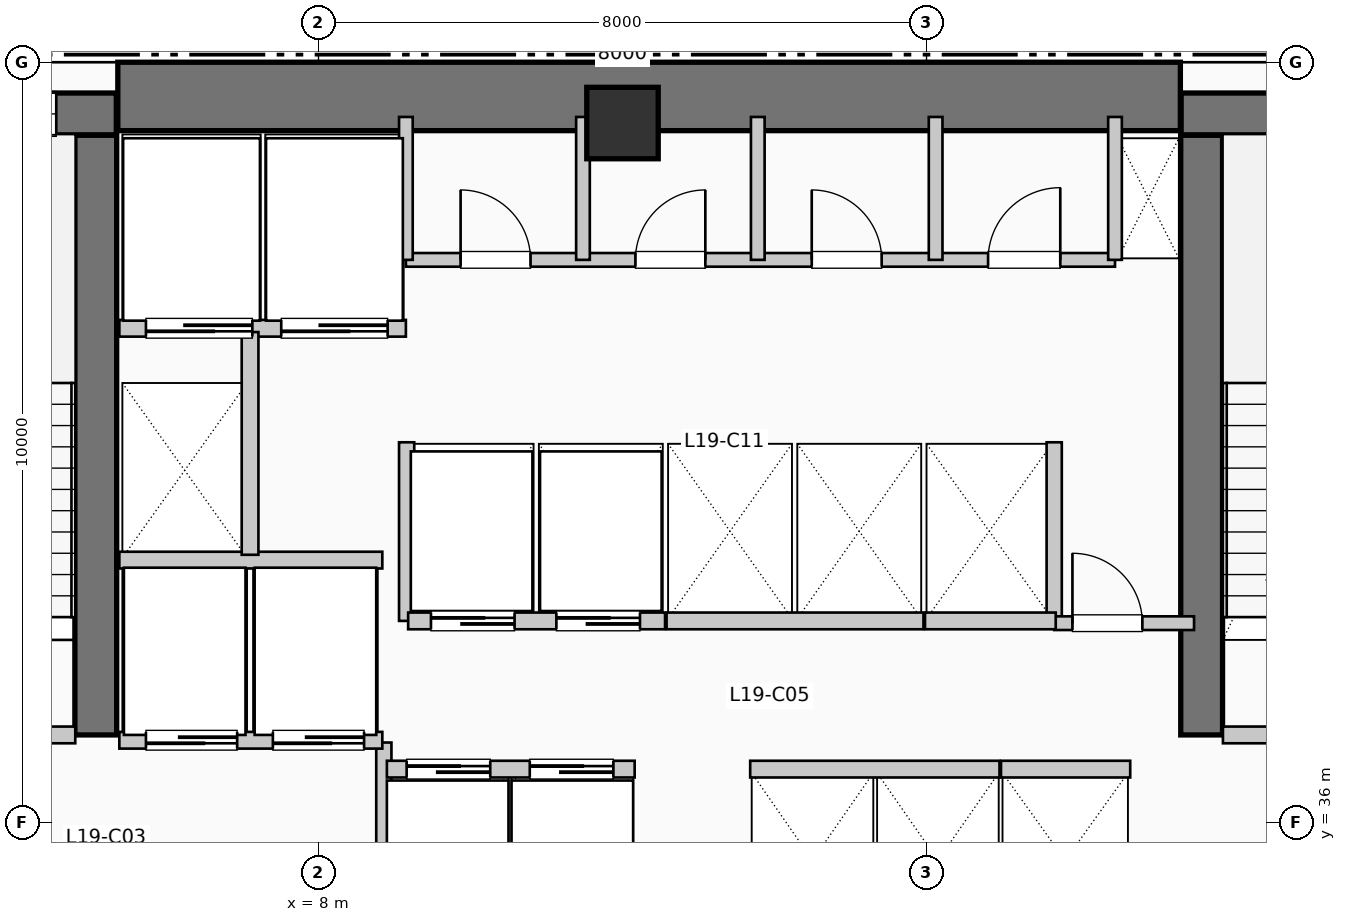
"""IFC4 building model, lengths in metres.
Left out: names, types, materials, properties, quantities, classifications, styles, units other than length and angle.
Written with IfcOpenShell. Run it as: python <this file> out.ifc"""

import sys

from ifc_helpers import new_model, si_unit, direction, frame, frame_2d, origin, origin_2d, place, context, subcontext, project, spatial, rectangle, extrude, element, fill, save


model = new_model("IFC4")
c1 = context("Model", 3, precision=1e-05, world=origin(), true_north=direction((0.0, 1.0)))
c2 = subcontext(c1, "Body", "Model", "MODEL_VIEW")
j1 = project(units=[si_unit("LENGTHUNIT", "METRE"), si_unit("PLANEANGLEUNIT", "RADIAN")], contexts=[c1])
p1 = place(None, origin())
s1 = spatial("IfcSite", under=j1, at=p1, CompositionType="ELEMENT")
p2 = place(p1, origin())
s2 = spatial("IfcBuilding", under=s1, at=p2, CompositionType="ELEMENT")
p3 = place(p2, frame((0.0, 0.0, 81.84)))
s3 = spatial("IfcBuildingStorey", under=s2, at=p3, CompositionType="ELEMENT", Elevation=81.84)
p4 = place(p3, frame((5.36, 45.55, 0.0), z_axis=(0.0, 0.0, 1.0), x_axis=(1.0, 0.0, 0.0)))
e1 = element("IfcWall", 1, at=p4, inside=s3, PredefinedType="SHEAR", context=c2, shape_type="SweptSolid", body=[
    extrude(rectangle(XDim=13.98, YDim=0.9, at=frame_2d((6.99, 0.0))), origin(), (0.0, 0.0, 1.0), 3.96),
])
p5 = place(p3, frame((5.07, 37.15, 0.0), z_axis=(0.0, 0.0, 1.0), x_axis=(0.0, 1.0, 0.0)))
e2 = element("IfcWall", 2, at=p5, inside=s3, PredefinedType="SHEAR", context=c2, shape_type="SweptSolid", body=[
    extrude(rectangle(XDim=7.89, YDim=0.55, at=frame_2d((3.945, 0.0))), origin(), (0.0, 0.0, 1.0), 3.96),
])
p6 = place(p3, frame((1.1, 45.32, 0.0), z_axis=(0.0, 0.0, 1.0), x_axis=(1.0, 0.0, 0.0)))
e3 = element("IfcWall", 3, at=p6, inside=s3, PredefinedType="SHEAR", context=c2, shape_type="SweptSolid", body=[
    extrude(rectangle(XDim=4.24, YDim=0.55, at=frame_2d((2.12, 0.0))), origin(), (0.0, 0.0, 1.0), 3.96),
])
p7 = place(p6, frame((2.05, 0.0, 1.05)))
e4 = element("IfcOpeningElement", 4, at=p7, cuts=e3, PredefinedType="OPENING", context=c2, shape_type="SweptSolid", body=[
    extrude(rectangle(XDim=1.4, YDim=1.8, at=frame_2d((0.7, 0.9))), frame((0.0, 0.285, 0.0), z_axis=(0.0, -1.0, 0.0), x_axis=(1.0, 0.0, 0.0)), (0.0, 0.0, 1.0), 0.57),
])
p8 = place(p3, frame((19.62, 37.15, 0.0), z_axis=(0.0, 0.0, 1.0), x_axis=(0.0, 1.0, 0.0)))
e5 = element("IfcWall", 5, at=p8, inside=s3, PredefinedType="SHEAR", context=c2, shape_type="SweptSolid", body=[
    extrude(rectangle(XDim=7.89, YDim=0.55, at=frame_2d((3.945, 0.0))), origin(), (0.0, 0.0, 1.0), 3.96),
])
p9 = place(p3, frame((19.35, 45.32, 0.0), z_axis=(0.0, 0.0, 1.0), x_axis=(1.0, 0.0, 0.0)))
e6 = element("IfcWall", 6, at=p9, inside=s3, PredefinedType="SHEAR", context=c2, shape_type="SweptSolid", body=[
    extrude(rectangle(XDim=3.69, YDim=0.55, at=frame_2d((1.845, 0.0))), origin(), (0.0, 0.0, 1.0), 3.96),
])
p10 = place(p9, frame((1.15, 0.0, 1.05)))
e7 = element("IfcOpeningElement", 7, at=p10, cuts=e6, PredefinedType="OPENING", context=c2, shape_type="SweptSolid", body=[
    extrude(rectangle(XDim=1.4, YDim=1.8, at=frame_2d((0.7, 0.9))), frame((0.0, 0.285, 0.0), z_axis=(0.0, -1.0, 0.0), x_axis=(1.0, 0.0, 0.0)), (0.0, 0.0, 1.0), 0.57),
])
p11 = place(p3, frame((12.0, 45.2, 0.0), z_axis=(0.0, 0.0, 1.0), x_axis=(1.0, 0.0, 0.0)))
e8 = element("IfcColumn", 8, at=p11, inside=s3, PredefinedType="COLUMN", context=c2, shape_type="SweptSolid", body=[
    extrude(rectangle(XDim=0.94, YDim=0.94, at=origin_2d()), origin(), (0.0, 0.0, 1.0), 3.96),
])
p12 = place(p3, frame((1.65, 37.15, 0.0), z_axis=(0.0, 0.0, 1.0), x_axis=(1.0, 0.0, 0.0)))
e9 = element("IfcWall", 9, at=p12, inside=s3, PredefinedType="PARTITIONING", context=c2, shape_type="SweptSolid", body=[
    extrude(rectangle(XDim=3.15, YDim=0.22, at=frame_2d((1.575, 0.0))), origin(), (0.0, 0.0, 1.0), 3.71),
])
p13 = place(p12, frame((2.05, 0.0, 0.0), z_axis=(0.0, 0.0, 1.0), x_axis=(-1.0, 0.0, 0.0)))
e10 = element("IfcOpeningElement", 10, at=p13, cuts=e9, PredefinedType="OPENING", context=c2, shape_type="SweptSolid", body=[
    extrude(rectangle(XDim=1.05, YDim=2.15, at=frame_2d((0.525, 1.075))), frame((0.0, 0.12, 0.0), z_axis=(0.0, -1.0, 0.0), x_axis=(1.0, 0.0, 0.0)), (0.0, 0.0, 1.0), 0.24),
])
p14 = place(p3, frame((8.86, 34.55, 0.0), z_axis=(0.0, 0.0, 1.0), x_axis=(0.0, 1.0, 0.0)))
e11 = element("IfcWall", 11, at=p14, inside=s3, PredefinedType="PARTITIONING", context=c2, shape_type="SweptSolid", body=[
    extrude(rectangle(XDim=2.5, YDim=0.2, at=frame_2d((1.25, 0.0))), origin(), (0.0, 0.0, 1.0), 3.71),
])
p15 = place(p3, frame((19.9, 37.15, 0.0), z_axis=(0.0, 0.0, 1.0), x_axis=(1.0, 0.0, 0.0)))
e12 = element("IfcWall", 12, at=p15, inside=s3, PredefinedType="PARTITIONING", context=c2, shape_type="SweptSolid", body=[
    extrude(rectangle(XDim=3.15, YDim=0.22, at=frame_2d((1.575, 0.0))), origin(), (0.0, 0.0, 1.0), 3.71),
])
p16 = place(p15, frame((2.05, 0.0, 0.0), z_axis=(0.0, 0.0, 1.0), x_axis=(-1.0, 0.0, 0.0)))
e13 = element("IfcOpeningElement", 13, at=p16, cuts=e12, PredefinedType="OPENING", context=c2, shape_type="SweptSolid", body=[
    extrude(rectangle(XDim=1.05, YDim=2.15, at=frame_2d((0.525, 1.075))), frame((0.0, 0.12, 0.0), z_axis=(0.0, -1.0, 0.0), x_axis=(1.0, 0.0, 0.0)), (0.0, 0.0, 1.0), 0.24),
])
p17 = place(p3, frame((5.38, 37.08, 0.0), z_axis=(0.0, 0.0, 1.0), x_axis=(1.0, 0.0, 0.0)))
e14 = element("IfcWall", 14, at=p17, inside=s3, PredefinedType="PARTITIONING", context=c2, shape_type="SweptSolid", body=[
    extrude(rectangle(XDim=3.46, YDim=0.22, at=frame_2d((1.73, 0.0))), origin(), (0.0, 0.0, 1.0), 3.71),
])
p18 = place(p17, frame((1.55, 0.0, 0.0), z_axis=(0.0, 0.0, 1.0), x_axis=(-1.0, 0.0, 0.0)))
e15 = element("IfcOpeningElement", 15, at=p18, cuts=e14, PredefinedType="OPENING", context=c2, shape_type="SweptSolid", body=[
    extrude(rectangle(XDim=1.2, YDim=2.2, at=frame_2d((0.6, 1.1))), frame((0.0, 0.12, 0.0), z_axis=(0.0, -1.0, 0.0), x_axis=(1.0, 0.0, 0.0)), (0.0, 0.0, 1.0), 0.24),
])
p19 = place(p17, frame((3.22, 0.0, 0.0), z_axis=(0.0, 0.0, 1.0), x_axis=(-1.0, 0.0, 0.0)))
e16 = element("IfcOpeningElement", 16, at=p19, cuts=e14, PredefinedType="OPENING", context=c2, shape_type="SweptSolid", body=[
    extrude(rectangle(XDim=1.2, YDim=2.2, at=frame_2d((0.6, 1.1))), frame((0.0, 0.12, 0.0), z_axis=(0.0, -1.0, 0.0), x_axis=(1.0, 0.0, 0.0)), (0.0, 0.0, 1.0), 0.24),
])
p20 = place(p3, frame((5.38, 39.45, 0.0), z_axis=(0.0, 0.0, 1.0), x_axis=(1.0, 0.0, 0.0)))
e17 = element("IfcWall", 17, at=p20, inside=s3, PredefinedType="PARTITIONING", context=c2, shape_type="SweptSolid", body=[
    extrude(rectangle(XDim=3.46, YDim=0.22, at=frame_2d((1.73, 0.0))), origin(), (0.0, 0.0, 1.0), 3.71),
])
p21 = place(p3, frame((5.38, 42.5, 0.0), z_axis=(0.0, 0.0, 1.0), x_axis=(1.0, 0.0, 0.0)))
e18 = element("IfcWall", 18, at=p21, inside=s3, PredefinedType="PARTITIONING", context=c2, shape_type="SweptSolid", body=[
    extrude(rectangle(XDim=3.77, YDim=0.22, at=frame_2d((1.885, 0.0))), origin(), (0.0, 0.0, 1.0), 3.71),
])
p22 = place(p21, frame((1.75, 0.0, 0.0), z_axis=(0.0, 0.0, 1.0), x_axis=(-1.0, 0.0, 0.0)))
e19 = element("IfcOpeningElement", 19, at=p22, cuts=e18, PredefinedType="OPENING", context=c2, shape_type="SweptSolid", body=[
    extrude(rectangle(XDim=1.4, YDim=2.2, at=frame_2d((0.7, 1.1))), frame((0.0, 0.12, 0.0), z_axis=(0.0, -1.0, 0.0), x_axis=(1.0, 0.0, 0.0)), (0.0, 0.0, 1.0), 0.24),
])
p23 = place(p21, frame((3.53, 0.0, 0.0), z_axis=(0.0, 0.0, 1.0), x_axis=(-1.0, 0.0, 0.0)))
e20 = element("IfcOpeningElement", 20, at=p23, cuts=e18, PredefinedType="OPENING", context=c2, shape_type="SweptSolid", body=[
    extrude(rectangle(XDim=1.4, YDim=2.2, at=frame_2d((0.7, 1.1))), frame((0.0, 0.12, 0.0), z_axis=(0.0, -1.0, 0.0), x_axis=(1.0, 0.0, 0.0)), (0.0, 0.0, 1.0), 0.24),
])
p24 = place(p3, frame((7.1, 39.52, 0.0), z_axis=(0.0, 0.0, 1.0), x_axis=(0.0, 1.0, 0.0)))
e21 = element("IfcWall", 21, at=p24, inside=s3, PredefinedType="PARTITIONING", context=c2, shape_type="SweptSolid", body=[
    extrude(rectangle(XDim=2.93, YDim=0.22, at=frame_2d((1.465, 0.0))), origin(), (0.0, 0.0, 1.0), 3.71),
])
for number, where, z_axis, x_axis in (
    (22, (9.16, 38.65, 0.0), (0.0, 0.0, 1.0), (0.0, 1.0, 0.0)),
    (23, (17.68, 38.65, 0.0), (0.0, 0.0, 1.0), (0.0, 1.0, 0.0)),
):
    element("IfcWall", number, at=place(p3, frame(where, z_axis=z_axis, x_axis=x_axis)), inside=s3, PredefinedType="PARTITIONING", context=c2, shape_type="SweptSolid", body=[
        extrude(rectangle(XDim=2.35, YDim=0.2, at=frame_2d((1.175, 0.0))), origin(), (0.0, 0.0, 1.0), 3.71),
    ])
p25 = place(p3, frame((17.68, 38.62, 0.0), z_axis=(0.0, 0.0, 1.0), x_axis=(1.0, 0.0, 0.0)))
e24 = element("IfcWall", 24, at=p25, inside=s3, PredefinedType="PARTITIONING", context=c2, shape_type="SweptSolid", body=[
    extrude(rectangle(XDim=1.84, YDim=0.18, at=frame_2d((0.92, 0.0))), origin(), (0.0, 0.0, 1.0), 3.71),
])
p26 = place(p25, frame((0.24, 0.0, 0.0)))
e25 = element("IfcOpeningElement", 25, at=p26, cuts=e24, PredefinedType="OPENING", context=c2, shape_type="SweptSolid", body=[
    extrude(rectangle(XDim=0.92, YDim=2.1, at=frame_2d((0.46, 1.05))), frame((0.0, 0.1, 0.0), z_axis=(0.0, -1.0, 0.0), x_axis=(1.0, 0.0, 0.0)), (0.0, 0.0, 1.0), 0.2),
])
p27 = place(p3, frame((8.9, 36.7, 0.0), z_axis=(0.0, 0.0, 1.0), x_axis=(1.0, 0.0, 0.0)))
e26 = element("IfcWall", 26, at=p27, inside=s3, PredefinedType="PARTITIONING", context=c2, shape_type="SweptSolid", body=[
    extrude(rectangle(XDim=3.26, YDim=0.22, at=frame_2d((1.63, 0.0))), origin(), (0.0, 0.0, 1.0), 3.71),
])
p28 = place(p27, frame((0.26, 0.0, 0.0)))
e27 = element("IfcOpeningElement", 27, at=p28, cuts=e26, PredefinedType="OPENING", context=c2, shape_type="SweptSolid", body=[
    extrude(rectangle(XDim=1.1, YDim=2.2, at=frame_2d((0.55, 1.1))), frame((0.0, 0.12, 0.0), z_axis=(0.0, -1.0, 0.0), x_axis=(1.0, 0.0, 0.0)), (0.0, 0.0, 1.0), 0.24),
])
p29 = place(p27, frame((1.88, 0.0, 0.0)))
e28 = element("IfcOpeningElement", 28, at=p29, cuts=e26, PredefinedType="OPENING", context=c2, shape_type="SweptSolid", body=[
    extrude(rectangle(XDim=1.1, YDim=2.2, at=frame_2d((0.55, 1.1))), frame((0.0, 0.12, 0.0), z_axis=(0.0, -1.0, 0.0), x_axis=(1.0, 0.0, 0.0)), (0.0, 0.0, 1.0), 0.24),
])
p30 = place(p3, frame((9.18, 38.65, 0.0), z_axis=(0.0, 0.0, 1.0), x_axis=(1.0, 0.0, 0.0)))
e29 = element("IfcWall", 29, at=p30, inside=s3, PredefinedType="PARTITIONING", context=c2, shape_type="SweptSolid", body=[
    extrude(rectangle(XDim=3.38, YDim=0.22, at=frame_2d((1.69, 0.0))), origin(), (0.0, 0.0, 1.0), 3.71),
])
p31 = place(p30, frame((0.3, 0.0, 0.0)))
e30 = element("IfcOpeningElement", 30, at=p31, cuts=e29, PredefinedType="OPENING", context=c2, shape_type="SweptSolid", body=[
    extrude(rectangle(XDim=1.1, YDim=2.2, at=frame_2d((0.55, 1.1))), frame((0.0, 0.12, 0.0), z_axis=(0.0, -1.0, 0.0), x_axis=(1.0, 0.0, 0.0)), (0.0, 0.0, 1.0), 0.24),
])
p32 = place(p30, frame((1.95, 0.0, 0.0)))
e31 = element("IfcOpeningElement", 31, at=p32, cuts=e29, PredefinedType="OPENING", context=c2, shape_type="SweptSolid", body=[
    extrude(rectangle(XDim=1.1, YDim=2.2, at=frame_2d((0.55, 1.1))), frame((0.0, 0.12, 0.0), z_axis=(0.0, -1.0, 0.0), x_axis=(1.0, 0.0, 0.0)), (0.0, 0.0, 1.0), 0.24),
])
p33 = place(p3, frame((13.68, 36.7, 0.0), z_axis=(0.0, 0.0, 1.0), x_axis=(1.0, 0.0, 0.0)))
e32 = element("IfcWall", 32, at=p33, inside=s3, PredefinedType="PARTITIONING", context=c2, shape_type="SweptSolid", body=[
    extrude(rectangle(XDim=3.28, YDim=0.22, at=frame_2d((1.64, 0.0))), origin(), (0.0, 0.0, 1.0), 3.71),
])
p34 = place(p3, frame((12.58, 38.65, 0.0), z_axis=(0.0, 0.0, 1.0), x_axis=(1.0, 0.0, 0.0)))
e33 = element("IfcWall", 33, at=p34, inside=s3, PredefinedType="PARTITIONING", context=c2, shape_type="SweptSolid", body=[
    extrude(rectangle(XDim=3.38, YDim=0.22, at=frame_2d((1.69, 0.0))), origin(), (0.0, 0.0, 1.0), 3.71),
])
p35 = place(p3, frame((16.98, 36.7, 0.0), z_axis=(0.0, 0.0, 1.0), x_axis=(1.0, 0.0, 0.0)))
e34 = element("IfcWall", 34, at=p35, inside=s3, PredefinedType="PARTITIONING", context=c2, shape_type="SweptSolid", body=[
    extrude(rectangle(XDim=1.7, YDim=0.22, at=frame_2d((0.85, 0.0))), origin(), (0.0, 0.0, 1.0), 3.71),
])
p36 = place(p3, frame((15.98, 38.65, 0.0), z_axis=(0.0, 0.0, 1.0), x_axis=(1.0, 0.0, 0.0)))
e35 = element("IfcWall", 35, at=p36, inside=s3, PredefinedType="PARTITIONING", context=c2, shape_type="SweptSolid", body=[
    extrude(rectangle(XDim=1.72, YDim=0.22, at=frame_2d((0.86, 0.0))), origin(), (0.0, 0.0, 1.0), 3.71),
])
p37 = place(p3, frame((9.15, 43.4, 0.0), z_axis=(0.0, 0.0, 1.0), x_axis=(1.0, 0.0, 0.0)))
e36 = element("IfcWall", 36, at=p37, inside=s3, PredefinedType="PLUMBINGWALL", context=c2, shape_type="SweptSolid", body=[
    extrude(rectangle(XDim=9.33, YDim=0.18, at=frame_2d((4.665, 0.0))), origin(), (0.0, 0.0, 1.0), 3.71),
])
p38 = place(p37, frame((0.72, 0.0, 0.0)))
e37 = element("IfcOpeningElement", 37, at=p38, cuts=e36, PredefinedType="OPENING", context=c2, shape_type="SweptSolid", body=[
    extrude(rectangle(XDim=0.92, YDim=2.1, at=frame_2d((0.46, 1.05))), frame((0.0, 0.1, 0.0), z_axis=(0.0, -1.0, 0.0), x_axis=(1.0, 0.0, 0.0)), (0.0, 0.0, 1.0), 0.2),
])
p39 = place(p37, frame((3.02, 0.0, 0.0)))
e38 = element("IfcOpeningElement", 38, at=p39, cuts=e36, PredefinedType="OPENING", context=c2, shape_type="SweptSolid", body=[
    extrude(rectangle(XDim=0.92, YDim=2.1, at=frame_2d((0.46, 1.05))), frame((0.0, 0.1, 0.0), z_axis=(0.0, -1.0, 0.0), x_axis=(1.0, 0.0, 0.0)), (0.0, 0.0, 1.0), 0.2),
])
p40 = place(p37, frame((5.34, 0.0, 0.0)))
e39 = element("IfcOpeningElement", 39, at=p40, cuts=e36, PredefinedType="OPENING", context=c2, shape_type="SweptSolid", body=[
    extrude(rectangle(XDim=0.92, YDim=2.1, at=frame_2d((0.46, 1.05))), frame((0.0, 0.1, 0.0), z_axis=(0.0, -1.0, 0.0), x_axis=(1.0, 0.0, 0.0)), (0.0, 0.0, 1.0), 0.2),
])
p41 = place(p37, frame((7.66, 0.0, 0.0)))
e40 = element("IfcOpeningElement", 40, at=p41, cuts=e36, PredefinedType="OPENING", context=c2, shape_type="SweptSolid", body=[
    extrude(rectangle(XDim=0.95, YDim=2.1, at=frame_2d((0.475, 1.05))), frame((0.0, 0.1, 0.0), z_axis=(0.0, -1.0, 0.0), x_axis=(1.0, 0.0, 0.0)), (0.0, 0.0, 1.0), 0.2),
])
for number, where, z_axis, x_axis in (
    (41, (9.15, 43.4, 0.0), (0.0, 0.0, 1.0), (0.0, 1.0, 0.0)),
    (42, (18.48, 43.4, 0.0), (0.0, 0.0, 1.0), (0.0, 1.0, 0.0)),
    (43, (11.48, 43.4, 0.0), (0.0, 0.0, 1.0), (0.0, 1.0, 0.0)),
    (44, (13.78, 43.4, 0.0), (0.0, 0.0, 1.0), (0.0, 1.0, 0.0)),
    (45, (16.12, 43.4, 0.0), (0.0, 0.0, 1.0), (0.0, 1.0, 0.0)),
):
    element("IfcWall", number, at=place(p3, frame(where, z_axis=z_axis, x_axis=x_axis)), inside=s3, PredefinedType="PLUMBINGWALL", context=c2, shape_type="SweptSolid", body=[
        extrude(rectangle(XDim=1.88, YDim=0.18, at=frame_2d((0.94, 0.0))), origin(), (0.0, 0.0, 1.0), 3.71),
    ])
p42 = place(p7, origin())
e46 = element("IfcWindow", 46, at=p42, inside=s3, PartitioningType="SINGLE_PANEL", PredefinedType="WINDOW", context=c2, shape_type="SweptSolid", body=[
    extrude(rectangle(XDim=1.4, YDim=1.8, at=frame_2d((0.7, 0.9))), frame((0.0, 0.03, 0.0), z_axis=(0.0, -1.0, 0.0), x_axis=(1.0, 0.0, 0.0)), (0.0, 0.0, 1.0), 0.06),
])
fill(e4, e46)
p43 = place(p18, origin())
e47 = element("IfcDoor", 47, at=p43, inside=s3, OperationType="SLIDING_TO_RIGHT", PredefinedType="DOOR", context=c2, shape_type="SweptSolid", body=[
    extrude(rectangle(XDim=1.2, YDim=2.2, at=frame_2d((0.6, 1.1))), frame((0.0, 0.025, 0.0), z_axis=(0.0, -1.0, 0.0), x_axis=(1.0, 0.0, 0.0)), (0.0, 0.0, 1.0), 0.05),
])
fill(e15, e47)
p44 = place(p19, origin())
e48 = element("IfcDoor", 48, at=p44, inside=s3, OperationType="SLIDING_TO_RIGHT", PredefinedType="DOOR", context=c2, shape_type="SweptSolid", body=[
    extrude(rectangle(XDim=1.2, YDim=2.2, at=frame_2d((0.6, 1.1))), frame((0.0, 0.025, 0.0), z_axis=(0.0, -1.0, 0.0), x_axis=(1.0, 0.0, 0.0)), (0.0, 0.0, 1.0), 0.05),
])
fill(e16, e48)
p45 = place(p22, origin())
e49 = element("IfcDoor", 49, at=p45, inside=s3, OperationType="SLIDING_TO_LEFT", PredefinedType="DOOR", context=c2, shape_type="SweptSolid", body=[
    extrude(rectangle(XDim=1.4, YDim=2.2, at=frame_2d((0.7, 1.1))), frame((0.0, 0.025, 0.0), z_axis=(0.0, -1.0, 0.0), x_axis=(1.0, 0.0, 0.0)), (0.0, 0.0, 1.0), 0.05),
])
fill(e19, e49)
p46 = place(p23, origin())
e50 = element("IfcDoor", 50, at=p46, inside=s3, OperationType="SLIDING_TO_LEFT", PredefinedType="DOOR", context=c2, shape_type="SweptSolid", body=[
    extrude(rectangle(XDim=1.4, YDim=2.2, at=frame_2d((0.7, 1.1))), frame((0.0, 0.025, 0.0), z_axis=(0.0, -1.0, 0.0), x_axis=(1.0, 0.0, 0.0)), (0.0, 0.0, 1.0), 0.05),
])
fill(e20, e50)
p47 = place(p26, origin())
e51 = element("IfcDoor", 51, at=p47, inside=s3, OperationType="SINGLE_SWING_LEFT", PredefinedType="DOOR", context=c2, shape_type="SweptSolid", body=[
    extrude(rectangle(XDim=0.92, YDim=2.1, at=frame_2d((0.46, 1.05))), frame((0.0, 0.025, 0.0), z_axis=(0.0, -1.0, 0.0), x_axis=(1.0, 0.0, 0.0)), (0.0, 0.0, 1.0), 0.05),
])
fill(e25, e51)
p48 = place(p28, origin())
e52 = element("IfcDoor", 52, at=p48, inside=s3, OperationType="SLIDING_TO_LEFT", PredefinedType="DOOR", context=c2, shape_type="SweptSolid", body=[
    extrude(rectangle(XDim=1.1, YDim=2.2, at=frame_2d((0.55, 1.1))), frame((0.0, 0.025, 0.0), z_axis=(0.0, -1.0, 0.0), x_axis=(1.0, 0.0, 0.0)), (0.0, 0.0, 1.0), 0.05),
])
fill(e27, e52)
p49 = place(p29, origin())
e53 = element("IfcDoor", 53, at=p49, inside=s3, OperationType="SLIDING_TO_LEFT", PredefinedType="DOOR", context=c2, shape_type="SweptSolid", body=[
    extrude(rectangle(XDim=1.1, YDim=2.2, at=frame_2d((0.55, 1.1))), frame((0.0, 0.025, 0.0), z_axis=(0.0, -1.0, 0.0), x_axis=(1.0, 0.0, 0.0)), (0.0, 0.0, 1.0), 0.05),
])
fill(e28, e53)
p50 = place(p31, origin())
e54 = element("IfcDoor", 54, at=p50, inside=s3, OperationType="SLIDING_TO_LEFT", PredefinedType="DOOR", context=c2, shape_type="SweptSolid", body=[
    extrude(rectangle(XDim=1.1, YDim=2.2, at=frame_2d((0.55, 1.1))), frame((0.0, 0.025, 0.0), z_axis=(0.0, -1.0, 0.0), x_axis=(1.0, 0.0, 0.0)), (0.0, 0.0, 1.0), 0.05),
])
fill(e30, e54)
p51 = place(p32, origin())
e55 = element("IfcDoor", 55, at=p51, inside=s3, OperationType="SLIDING_TO_LEFT", PredefinedType="DOOR", context=c2, shape_type="SweptSolid", body=[
    extrude(rectangle(XDim=1.1, YDim=2.2, at=frame_2d((0.55, 1.1))), frame((0.0, 0.025, 0.0), z_axis=(0.0, -1.0, 0.0), x_axis=(1.0, 0.0, 0.0)), (0.0, 0.0, 1.0), 0.05),
])
fill(e31, e55)
p52 = place(p38, origin())
e56 = element("IfcDoor", 56, at=p52, inside=s3, OperationType="SINGLE_SWING_LEFT", PredefinedType="DOOR", context=c2, shape_type="SweptSolid", body=[
    extrude(rectangle(XDim=0.92, YDim=2.1, at=frame_2d((0.46, 1.05))), frame((0.0, 0.025, 0.0), z_axis=(0.0, -1.0, 0.0), x_axis=(1.0, 0.0, 0.0)), (0.0, 0.0, 1.0), 0.05),
])
fill(e37, e56)
p53 = place(p39, origin())
e57 = element("IfcDoor", 57, at=p53, inside=s3, OperationType="SINGLE_SWING_RIGHT", PredefinedType="DOOR", context=c2, shape_type="SweptSolid", body=[
    extrude(rectangle(XDim=0.92, YDim=2.1, at=frame_2d((0.46, 1.05))), frame((0.0, 0.025, 0.0), z_axis=(0.0, -1.0, 0.0), x_axis=(1.0, 0.0, 0.0)), (0.0, 0.0, 1.0), 0.05),
])
fill(e38, e57)
p54 = place(p40, origin())
e58 = element("IfcDoor", 58, at=p54, inside=s3, OperationType="SINGLE_SWING_LEFT", PredefinedType="DOOR", context=c2, shape_type="SweptSolid", body=[
    extrude(rectangle(XDim=0.92, YDim=2.1, at=frame_2d((0.46, 1.05))), frame((0.0, 0.025, 0.0), z_axis=(0.0, -1.0, 0.0), x_axis=(1.0, 0.0, 0.0)), (0.0, 0.0, 1.0), 0.05),
])
fill(e39, e58)
p55 = place(p41, origin())
e59 = element("IfcDoor", 59, at=p55, inside=s3, OperationType="SINGLE_SWING_RIGHT", PredefinedType="DOOR", context=c2, shape_type="SweptSolid", body=[
    extrude(rectangle(XDim=0.95, YDim=2.1, at=frame_2d((0.475, 1.05))), frame((0.0, 0.025, 0.0), z_axis=(0.0, -1.0, 0.0), x_axis=(1.0, 0.0, 0.0)), (0.0, 0.0, 1.0), 0.05),
])
fill(e40, e59)
save(model, sys.argv[1])
